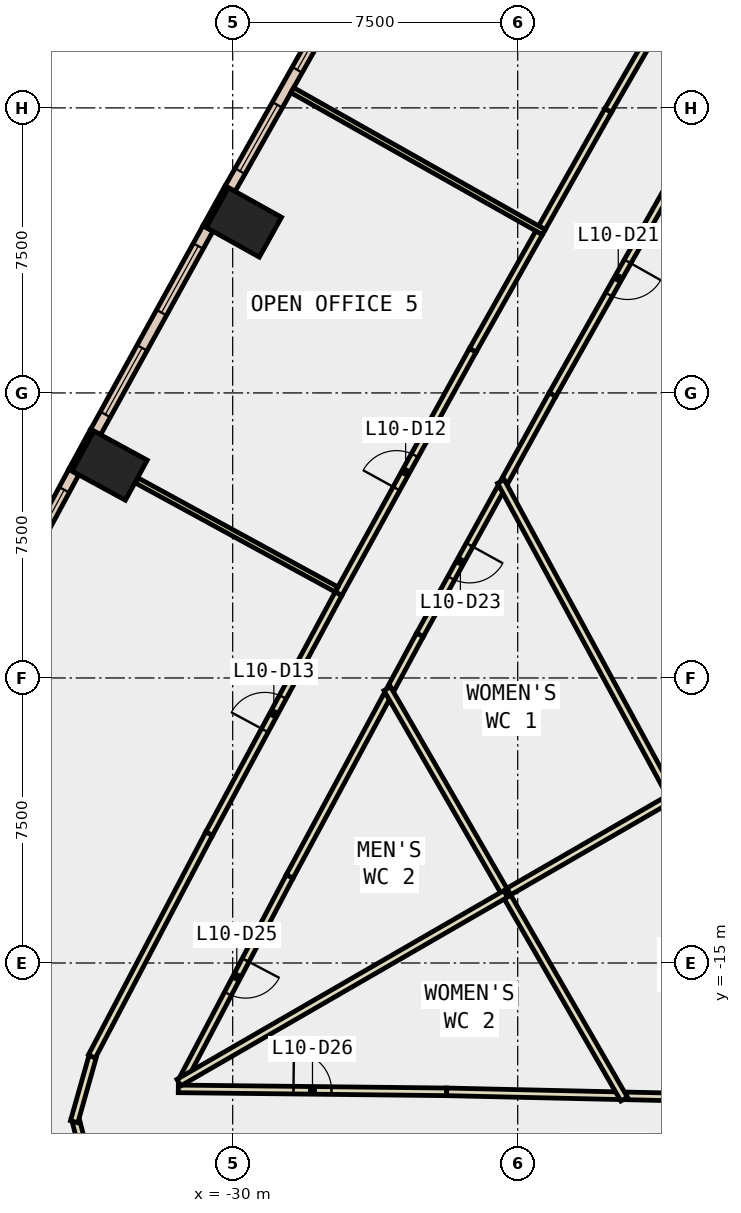
"""IFC4 building model, lengths in metres.
Left out: names, types, materials, properties, quantities, classifications, styles, units other than length and angle.
Written with IfcOpenShell. Run it as: python <this file> out.ifc"""

import sys

from ifc_helpers import new_model, si_unit, direction, frame, frame_2d, origin, origin_2d, place, context, subcontext, project, spatial, rectangle, extrude, element, fill, save


model = new_model("IFC4")
c1 = context("Model", 3, precision=1e-05, world=origin(), true_north=direction((0.0, 1.0)))
c2 = subcontext(c1, "Body", "Model", "MODEL_VIEW")
j1 = project(units=[si_unit("LENGTHUNIT", "METRE"), si_unit("PLANEANGLEUNIT", "RADIAN")], contexts=[c1])
p1 = place(None, origin())
s1 = spatial("IfcSite", under=j1, at=p1, CompositionType="ELEMENT")
p2 = place(p1, origin())
s2 = spatial("IfcBuilding", under=s1, at=p2, CompositionType="ELEMENT")
p3 = place(p2, frame((0.0, 0.0, 51.8)))
s3 = spatial("IfcBuildingStorey", under=s2, at=p3, CompositionType="ELEMENT", Elevation=51.8)
for number, where, z_axis, x_axis in (
    (1, (-29.706, 4.487, -0.4), (0.0, 0.0, 1.0), (0.487, 0.873, 0.0)),
    (2, (-33.238, -1.913, -0.4), (0.0, 0.0, 1.0), (0.478, 0.878, 0.0)),
):
    element("IfcColumn", number, at=place(p3, frame(where, z_axis=z_axis, x_axis=x_axis)), inside=s3, PredefinedType="COLUMN", context=c2, shape_type="SweptSolid", body=[
        extrude(rectangle(XDim=1.2, YDim=1.6, at=origin_2d()), origin(), (0.0, 0.0, 1.0), 4.2),
    ])
p4 = place(p3, frame((-30.156, 5.425, 0.0), z_axis=(0.0, 0.0, 1.0), x_axis=(-0.486730996044, -0.87355190887, 0.0)))
e3 = element("IfcWall", 3, at=p4, inside=s3, PredefinedType="STANDARD", context=c2, shape_type="SweptSolid", body=[
    extrude(rectangle(XDim=1.2, YDim=0.1, at=frame_2d((0.6, 0.0))), origin(), (0.0, 0.0, 1.0), 3.8),
])
p5 = place(p3, frame((-33.697, -0.98, 0.0), z_axis=(0.0, 0.0, 1.0), x_axis=(-0.478267644701, -0.878214131082, 0.0)))
e4 = element("IfcWall", 4, at=p5, inside=s3, PredefinedType="STANDARD", context=c2, shape_type="SweptSolid", body=[
    extrude(rectangle(XDim=1.2, YDim=0.1, at=frame_2d((0.6, 0.0))), origin(), (0.0, 0.0, 1.0), 3.8),
])
p6 = place(p3, frame((-27.058, 10.705, 0.0), z_axis=(0.0, 0.0, 1.0), x_axis=(-0.49151046248, -0.870871669807, 0.0)))
e5 = element("IfcWall", 5, at=p6, inside=s3, PredefinedType="STANDARD", context=c2, shape_type="SweptSolid", body=[
    extrude(rectangle(XDim=6.122, YDim=0.3, at=frame_2d((3.061, 0.0))), origin(), (0.0, 0.0, 1.0), 3.8),
])
p7 = place(p6, frame((0.53, 0.0, 0.9)))
e6 = element("IfcOpeningElement", 6, at=p7, cuts=e5, PredefinedType="OPENING", context=c2, shape_type="SweptSolid", body=[
    extrude(rectangle(XDim=2.0, YDim=2.6, at=frame_2d((1.0, 1.3))), frame((0.0, 0.16, 0.0), z_axis=(0.0, -1.0, 0.0), x_axis=(1.0, 0.0, 0.0)), (0.0, 0.0, 1.0), 0.32),
])
p8 = place(p6, frame((3.591, 0.0, 0.9)))
e7 = element("IfcOpeningElement", 7, at=p8, cuts=e5, PredefinedType="OPENING", context=c2, shape_type="SweptSolid", body=[
    extrude(rectangle(XDim=2.0, YDim=2.6, at=frame_2d((1.0, 1.3))), frame((0.0, 0.16, 0.0), z_axis=(0.0, -1.0, 0.0), x_axis=(1.0, 0.0, 0.0)), (0.0, 0.0, 1.0), 0.32),
])
p9 = place(p3, frame((-30.65, 4.328, 0.0), z_axis=(0.0, 0.0, 1.0), x_axis=(-0.483195456594, -0.875512507465, 0.0)))
e8 = element("IfcWall", 8, at=p9, inside=s3, PredefinedType="STANDARD", context=c2, shape_type="SweptSolid", body=[
    extrude(rectangle(XDim=6.12, YDim=0.3, at=frame_2d((3.06, 0.0))), origin(), (0.0, 0.0, 1.0), 3.8),
])
p10 = place(p9, frame((0.53, 0.0, 0.9)))
e9 = element("IfcOpeningElement", 9, at=p10, cuts=e8, PredefinedType="OPENING", context=c2, shape_type="SweptSolid", body=[
    extrude(rectangle(XDim=2.0, YDim=2.6, at=frame_2d((1.0, 1.3))), frame((0.0, 0.16, 0.0), z_axis=(0.0, -1.0, 0.0), x_axis=(1.0, 0.0, 0.0)), (0.0, 0.0, 1.0), 0.32),
])
p11 = place(p9, frame((3.59, 0.0, 0.9)))
e10 = element("IfcOpeningElement", 10, at=p11, cuts=e8, PredefinedType="OPENING", context=c2, shape_type="SweptSolid", body=[
    extrude(rectangle(XDim=2.0, YDim=2.6, at=frame_2d((1.0, 1.3))), frame((0.0, 0.16, 0.0), z_axis=(0.0, -1.0, 0.0), x_axis=(1.0, 0.0, 0.0)), (0.0, 0.0, 1.0), 0.32),
])
p12 = place(p3, frame((-34.181, -2.082, 0.0), z_axis=(0.0, 0.0, 1.0), x_axis=(-0.474584950749, -0.880209704856, 0.0)))
e11 = element("IfcWall", 11, at=p12, inside=s3, PredefinedType="STANDARD", context=c2, shape_type="SweptSolid", body=[
    extrude(rectangle(XDim=6.121, YDim=0.3, at=frame_2d((3.061, 0.0))), origin(), (0.0, 0.0, 1.0), 3.8),
])
p13 = place(p12, frame((0.53, 0.0, 0.9)))
e12 = element("IfcOpeningElement", 12, at=p13, cuts=e11, PredefinedType="OPENING", context=c2, shape_type="SweptSolid", body=[
    extrude(rectangle(XDim=2.0, YDim=2.6, at=frame_2d((1.0, 1.3))), frame((0.0, 0.16, 0.0), z_axis=(0.0, -1.0, 0.0), x_axis=(1.0, 0.0, 0.0)), (0.0, 0.0, 1.0), 0.32),
])
p14 = place(p12, frame((3.591, 0.0, 0.9)))
e13 = element("IfcOpeningElement", 13, at=p14, cuts=e11, PredefinedType="OPENING", context=c2, shape_type="SweptSolid", body=[
    extrude(rectangle(XDim=2.0, YDim=2.6, at=frame_2d((1.0, 1.3))), frame((0.0, 0.16, 0.0), z_axis=(0.0, -1.0, 0.0), x_axis=(1.0, 0.0, 0.0)), (0.0, 0.0, 1.0), 0.32),
])
p15 = place(p3, frame((-18.122, 6.092, 0.0), z_axis=(0.0, 0.0, 1.0), x_axis=(-0.491430359405, -0.870916874251, 0.0)))
e14 = element("IfcWall", 14, at=p15, inside=s3, PredefinedType="PARTITIONING", context=c2, shape_type="SweptSolid", body=[
    extrude(rectangle(XDim=7.047, YDim=0.2, at=frame_2d((3.523, 0.0))), origin(), (0.0, 0.0, 1.0), 3.8),
])
p16 = place(p15, frame((3.024, 0.0, 0.0)))
e15 = element("IfcOpeningElement", 15, at=p16, cuts=e14, PredefinedType="OPENING", context=c2, shape_type="SweptSolid", body=[
    extrude(rectangle(XDim=1.0, YDim=2.1, at=frame_2d((0.5, 1.05))), frame((0.0, 0.11, 0.0), z_axis=(0.0, -1.0, 0.0), x_axis=(1.0, 0.0, 0.0)), (0.0, 0.0, 1.0), 0.22),
])
p17 = place(p3, frame((-21.585, -0.045, 0.0), z_axis=(0.0, 0.0, 1.0), x_axis=(-0.483139162319, -0.875543573921, 0.0)))
e16 = element("IfcWall", 16, at=p17, inside=s3, PredefinedType="PARTITIONING", context=c2, shape_type="SweptSolid", body=[
    extrude(rectangle(XDim=2.61, YDim=0.2, at=frame_2d((1.305, 0.0))), origin(), (0.0, 0.0, 1.0), 3.8),
])
p18 = place(p3, frame((-22.942, -2.505, 0.0), z_axis=(0.0, 0.0, 1.0), x_axis=(-0.48320751977, -0.875505849688, 0.0)))
e17 = element("IfcWall", 17, at=p18, inside=s3, PredefinedType="PARTITIONING", context=c2, shape_type="SweptSolid", body=[
    extrude(rectangle(XDim=4.412, YDim=0.2, at=frame_2d((2.206, 0.0))), origin(), (0.0, 0.0, 1.0), 3.8),
])
p19 = place(p18, frame((1.706, 0.0, 0.0)))
e18 = element("IfcOpeningElement", 18, at=p19, cuts=e17, PredefinedType="OPENING", context=c2, shape_type="SweptSolid", body=[
    extrude(rectangle(XDim=1.0, YDim=2.1, at=frame_2d((0.5, 1.05))), frame((0.0, 0.11, 0.0), z_axis=(0.0, -1.0, 0.0), x_axis=(1.0, 0.0, 0.0)), (0.0, 0.0, 1.0), 0.22),
])
p20 = place(p3, frame((-25.074, -6.368, 0.0), z_axis=(0.0, 0.0, 1.0), x_axis=(-0.474616646546, -0.880192614614, 0.0)))
e19 = element("IfcWall", 19, at=p20, inside=s3, PredefinedType="PARTITIONING", context=c2, shape_type="SweptSolid", body=[
    extrude(rectangle(XDim=1.605, YDim=0.2, at=frame_2d((0.803, 0.0))), origin(), (0.0, 0.0, 1.0), 3.8),
])
p21 = place(p3, frame((-19.649, -18.496, 0.0), z_axis=(0.0, 0.0, 1.0), x_axis=(0.999744980574, -0.02258259988, 0.0)))
e20 = element("IfcWall", 20, at=p21, inside=s3, PredefinedType="PARTITIONING", context=c2, shape_type="SweptSolid", body=[
    extrude(rectangle(XDim=3.676, YDim=0.2, at=frame_2d((1.838, 0.0))), origin(), (0.0, 0.0, 1.0), 3.8),
])
p22 = place(p3, frame((-25.931, -7.957, 0.0), z_axis=(0.0, 0.0, 1.0), x_axis=(-0.474554072379, -0.880226352928, 0.0)))
e21 = element("IfcWall", 21, at=p22, inside=s3, PredefinedType="PARTITIONING", context=c2, shape_type="SweptSolid", body=[
    extrude(rectangle(XDim=5.416, YDim=0.2, at=frame_2d((2.708, 0.0))), origin(), (0.0, 0.0, 1.0), 3.8),
])
p23 = place(p3, frame((-28.501, -12.724, 0.0), z_axis=(0.0, 0.0, 1.0), x_axis=(-0.465933418625, -0.884819783576, 0.0)))
e22 = element("IfcWall", 22, at=p23, inside=s3, PredefinedType="PARTITIONING", context=c2, shape_type="SweptSolid", body=[
    extrude(rectangle(XDim=5.973, YDim=0.2, at=frame_2d((2.986, 0.0))), origin(), (0.0, 0.0, 1.0), 3.8),
])
p24 = place(p23, frame((2.486, 0.0, 0.0)))
e23 = element("IfcOpeningElement", 23, at=p24, cuts=e22, PredefinedType="OPENING", context=c2, shape_type="SweptSolid", body=[
    extrude(rectangle(XDim=1.0, YDim=2.1, at=frame_2d((0.5, 1.05))), frame((0.0, 0.11, 0.0), z_axis=(0.0, -1.0, 0.0), x_axis=(1.0, 0.0, 0.0)), (0.0, 0.0, 1.0), 0.22),
])
p25 = place(p3, frame((-31.431, -18.312, 0.0), z_axis=(0.0, 0.0, 1.0), x_axis=(0.999939195602, -0.011027470214, 0.0)))
e24 = element("IfcWall", 24, at=p25, inside=s3, PredefinedType="PARTITIONING", context=c2, shape_type="SweptSolid", body=[
    extrude(rectangle(XDim=7.062, YDim=0.2, at=frame_2d((3.531, 0.0))), origin(), (0.0, 0.0, 1.0), 3.8),
])
p26 = place(p25, frame((3.031, 0.0, 0.0)))
e25 = element("IfcOpeningElement", 25, at=p26, cuts=e24, PredefinedType="OPENING", context=c2, shape_type="SweptSolid", body=[
    extrude(rectangle(XDim=1.0, YDim=2.1, at=frame_2d((0.5, 1.05))), frame((0.0, 0.11, 0.0), z_axis=(0.0, -1.0, 0.0), x_axis=(1.0, 0.0, 0.0)), (0.0, 0.0, 1.0), 0.22),
])
p27 = place(p3, frame((-24.369, -18.39, 0.0), z_axis=(0.0, 0.0, 1.0), x_axis=(0.99974519793, -0.022572975354, 0.0)))
e26 = element("IfcWall", 26, at=p27, inside=s3, PredefinedType="PARTITIONING", context=c2, shape_type="SweptSolid", body=[
    extrude(rectangle(XDim=4.521, YDim=0.2, at=frame_2d((2.26, 0.0))), origin(), (0.0, 0.0, 1.0), 3.8),
])
p28 = place(p3, frame((-21.863, 4.345, 0.0), z_axis=(0.0, 0.0, 1.0), x_axis=(0.491394823876, 0.87093692485, 0.0)))
e27 = element("IfcWall", 27, at=p28, inside=s3, PredefinedType="PARTITIONING", context=c2, shape_type="SweptSolid", body=[
    extrude(rectangle(XDim=3.547, YDim=0.2, at=frame_2d((1.773, 0.0))), origin(), (0.0, 0.0, 1.0), 3.8),
])
p29 = place(p3, frame((-20.12, 7.434, 0.0), z_axis=(0.0, 0.0, 1.0), x_axis=(0.500039488902, 0.866002603656, 0.0)))
e28 = element("IfcWall", 28, at=p29, inside=s3, PredefinedType="PARTITIONING", context=c2, shape_type="SweptSolid", body=[
    extrude(rectangle(XDim=7.244, YDim=0.2, at=frame_2d((3.622, 0.0))), origin(), (0.0, 0.0, 1.0), 3.8),
])
p30 = place(p29, frame((3.122, 0.0, 0.0)))
e29 = element("IfcOpeningElement", 29, at=p30, cuts=e28, PredefinedType="OPENING", context=c2, shape_type="SweptSolid", body=[
    extrude(rectangle(XDim=1.0, YDim=2.1, at=frame_2d((0.5, 1.05))), frame((0.0, 0.11, 0.0), z_axis=(0.0, -1.0, 0.0), x_axis=(1.0, 0.0, 0.0)), (0.0, 0.0, 1.0), 0.22),
])
p31 = place(p3, frame((-27.217, -5.284, 0.0), z_axis=(0.0, 0.0, 1.0), x_axis=(0.483151415114, 0.875536812517, 0.0)))
e30 = element("IfcWall", 30, at=p31, inside=s3, PredefinedType="PARTITIONING", context=c2, shape_type="SweptSolid", body=[
    extrude(rectangle(XDim=7.319, YDim=0.2, at=frame_2d((3.659, 0.0))), origin(), (0.0, 0.0, 1.0), 3.8),
])
p32 = place(p31, frame((3.159, 0.0, 0.0)))
e31 = element("IfcOpeningElement", 31, at=p32, cuts=e30, PredefinedType="OPENING", context=c2, shape_type="SweptSolid", body=[
    extrude(rectangle(XDim=1.0, YDim=2.1, at=frame_2d((0.5, 1.05))), frame((0.0, 0.11, 0.0), z_axis=(0.0, -1.0, 0.0), x_axis=(1.0, 0.0, 0.0)), (0.0, 0.0, 1.0), 0.22),
])
p33 = place(p3, frame((-23.681, 1.124, 0.0), z_axis=(0.0, 0.0, 1.0), x_axis=(0.491485799319, 0.870885588965, 0.0)))
e32 = element("IfcWall", 32, at=p33, inside=s3, PredefinedType="PARTITIONING", context=c2, shape_type="SweptSolid", body=[
    extrude(rectangle(XDim=3.548, YDim=0.2, at=frame_2d((1.774, 0.0))), origin(), (0.0, 0.0, 1.0), 3.8),
])
p34 = place(p3, frame((-33.521, -20.105, 0.0), z_axis=(0.0, 0.0, 1.0), x_axis=(-0.713535335808, 0.700619243636, 0.0)))
e33 = element("IfcWall", 33, at=p34, inside=s3, PredefinedType="PARTITIONING", context=c2, shape_type="SweptSolid", body=[
    extrude(rectangle(XDim=0.775, YDim=0.2, at=frame_2d((0.387, 0.0))), origin(), (0.0, 0.0, 1.0), 3.8),
])
p35 = place(p3, frame((-34.003, -19.631, 0.0), z_axis=(0.0, 0.0, 1.0), x_axis=(-0.250111961061, 0.968216921425, 0.0)))
e34 = element("IfcWall", 34, at=p35, inside=s3, PredefinedType="PARTITIONING", context=c2, shape_type="SweptSolid", body=[
    extrude(rectangle(XDim=0.568, YDim=0.2, at=frame_2d((0.284, 0.0))), origin(), (0.0, 0.0, 1.0), 3.8),
])
p36 = place(p3, frame((-34.172, -19.177, 0.0), z_axis=(0.0, 0.0, 1.0), x_axis=(0.272780480932, 0.962076301144, 0.0)))
e35 = element("IfcWall", 35, at=p36, inside=s3, PredefinedType="PARTITIONING", context=c2, shape_type="SweptSolid", body=[
    extrude(rectangle(XDim=1.778, YDim=0.2, at=frame_2d((0.889, 0.0))), origin(), (0.0, 0.0, 1.0), 3.8),
])
p37 = place(p3, frame((-33.706, -17.458, 0.0), z_axis=(0.0, 0.0, 1.0), x_axis=(0.465905874098, 0.884834287582, 0.0)))
e36 = element("IfcWall", 36, at=p37, inside=s3, PredefinedType="PARTITIONING", context=c2, shape_type="SweptSolid", body=[
    extrude(rectangle(XDim=6.626, YDim=0.2, at=frame_2d((3.313, 0.0))), origin(), (0.0, 0.0, 1.0), 3.8),
])
p38 = place(p3, frame((-30.619, -11.595, 0.0), z_axis=(0.0, 0.0, 1.0), x_axis=(0.474595197669, 0.880204179921, 0.0)))
e37 = element("IfcWall", 37, at=p38, inside=s3, PredefinedType="PARTITIONING", context=c2, shape_type="SweptSolid", body=[
    extrude(rectangle(XDim=7.17, YDim=0.2, at=frame_2d((3.585, 0.0))), origin(), (0.0, 0.0, 1.0), 3.8),
])
p39 = place(p38, frame((3.085, 0.0, 0.0)))
e38 = element("IfcOpeningElement", 38, at=p39, cuts=e37, PredefinedType="OPENING", context=c2, shape_type="SweptSolid", body=[
    extrude(rectangle(XDim=1.0, YDim=2.1, at=frame_2d((0.5, 1.05))), frame((0.0, 0.11, 0.0), z_axis=(0.0, -1.0, 0.0), x_axis=(1.0, 0.0, 0.0)), (0.0, 0.0, 1.0), 0.22),
])
p40 = place(p3, frame((-18.384, -10.725, 0.0), z_axis=(0.0, 0.0, 1.0), x_axis=(-0.477137547132, 0.878828630119, 0.0)))
e39 = element("IfcWall", 39, at=p40, inside=s3, PredefinedType="PARTITIONING", context=c2, shape_type="SweptSolid", body=[
    extrude(rectangle(XDim=9.552, YDim=0.2, at=frame_2d((4.776, 0.0))), origin(), (0.0, 0.0, 1.0), 3.8),
])
p41 = place(p3, frame((-18.519, -10.687, 0.0), z_axis=(0.0, 0.0, 1.0), x_axis=(-0.866063668779, -0.499933717229, 0.0)))
e40 = element("IfcWall", 40, at=p41, inside=s3, PredefinedType="PARTITIONING", context=c2, shape_type="SweptSolid", body=[
    extrude(rectangle(XDim=4.969, YDim=0.2, at=frame_2d((2.484, 0.0))), origin(), (0.0, 0.0, 1.0), 3.8),
])
p42 = place(p3, frame((-22.822, -13.171, 0.0), z_axis=(0.0, 0.0, 1.0), x_axis=(-0.499974913987, 0.866039886717, 0.0)))
e41 = element("IfcWall", 41, at=p42, inside=s3, PredefinedType="PARTITIONING", context=c2, shape_type="SweptSolid", body=[
    extrude(rectangle(XDim=6.222, YDim=0.2, at=frame_2d((3.111, 0.0))), origin(), (0.0, 0.0, 1.0), 3.8),
])
p43 = place(p3, frame((-19.699, -18.581, 0.0), z_axis=(0.0, 0.0, 1.0), x_axis=(-0.499899838407, 0.866083224385, 0.0)))
e42 = element("IfcWall", 42, at=p43, inside=s3, PredefinedType="PARTITIONING", context=c2, shape_type="SweptSolid", body=[
    extrude(rectangle(XDim=6.235, YDim=0.2, at=frame_2d((3.118, 0.0))), origin(), (0.0, 0.0, 1.0), 3.8),
])
p44 = place(p3, frame((-22.816, -13.181, 0.0), z_axis=(0.0, 0.0, 1.0), x_axis=(-0.86601529143, -0.500017514703, 0.0)))
e43 = element("IfcWall", 43, at=p44, inside=s3, PredefinedType="PARTITIONING", context=c2, shape_type="SweptSolid", body=[
    extrude(rectangle(XDim=9.932, YDim=0.2, at=frame_2d((4.966, 0.0))), origin(), (0.0, 0.0, 1.0), 3.8),
])
p45 = place(p3, frame((-21.813, 4.231, 0.0), z_axis=(0.0, 0.0, 1.0), x_axis=(-0.870901264369, 0.491458022337, 0.0)))
e44 = element("IfcWall", 44, at=p45, inside=s3, PredefinedType="PARTITIONING", context=c2, shape_type="SweptSolid", body=[
    extrude(rectangle(XDim=7.6, YDim=0.15, at=frame_2d((3.8, 0.0))), origin(), (0.0, 0.0, 1.0), 3.8),
])
p46 = place(p3, frame((-27.268, -5.171, 0.0), z_axis=(0.0, 0.0, 1.0), x_axis=(-0.877837854343, 0.478957932895, 0.0)))
e45 = element("IfcWall", 45, at=p46, inside=s3, PredefinedType="PARTITIONING", context=c2, shape_type="SweptSolid", body=[
    extrude(rectangle(XDim=5.982, YDim=0.15, at=frame_2d((2.991, 0.0))), origin(), (0.0, 0.0, 1.0), 3.8),
])
p47 = place(p7, origin())
e46 = element("IfcWindow", 46, at=p47, inside=s3, PartitioningType="SINGLE_PANEL", PredefinedType="WINDOW", context=c2, shape_type="SweptSolid", body=[
    extrude(rectangle(XDim=2.0, YDim=2.6, at=frame_2d((1.0, 1.3))), frame((0.0, 0.03, 0.0), z_axis=(0.0, -1.0, 0.0), x_axis=(1.0, 0.0, 0.0)), (0.0, 0.0, 1.0), 0.06),
])
fill(e6, e46)
p48 = place(p8, origin())
e47 = element("IfcWindow", 47, at=p48, inside=s3, PartitioningType="SINGLE_PANEL", PredefinedType="WINDOW", context=c2, shape_type="SweptSolid", body=[
    extrude(rectangle(XDim=2.0, YDim=2.6, at=frame_2d((1.0, 1.3))), frame((0.0, 0.03, 0.0), z_axis=(0.0, -1.0, 0.0), x_axis=(1.0, 0.0, 0.0)), (0.0, 0.0, 1.0), 0.06),
])
fill(e7, e47)
p49 = place(p10, origin())
e48 = element("IfcWindow", 48, at=p49, inside=s3, PartitioningType="SINGLE_PANEL", PredefinedType="WINDOW", context=c2, shape_type="SweptSolid", body=[
    extrude(rectangle(XDim=2.0, YDim=2.6, at=frame_2d((1.0, 1.3))), frame((0.0, 0.03, 0.0), z_axis=(0.0, -1.0, 0.0), x_axis=(1.0, 0.0, 0.0)), (0.0, 0.0, 1.0), 0.06),
])
fill(e9, e48)
p50 = place(p11, origin())
e49 = element("IfcWindow", 49, at=p50, inside=s3, PartitioningType="SINGLE_PANEL", PredefinedType="WINDOW", context=c2, shape_type="SweptSolid", body=[
    extrude(rectangle(XDim=2.0, YDim=2.6, at=frame_2d((1.0, 1.3))), frame((0.0, 0.03, 0.0), z_axis=(0.0, -1.0, 0.0), x_axis=(1.0, 0.0, 0.0)), (0.0, 0.0, 1.0), 0.06),
])
fill(e10, e49)
p51 = place(p13, origin())
e50 = element("IfcWindow", 50, at=p51, inside=s3, PartitioningType="SINGLE_PANEL", PredefinedType="WINDOW", context=c2, shape_type="SweptSolid", body=[
    extrude(rectangle(XDim=2.0, YDim=2.6, at=frame_2d((1.0, 1.3))), frame((0.0, 0.03, 0.0), z_axis=(0.0, -1.0, 0.0), x_axis=(1.0, 0.0, 0.0)), (0.0, 0.0, 1.0), 0.06),
])
fill(e12, e50)
p52 = place(p32, origin())
e51 = element("IfcDoor", 51, at=p52, inside=s3, OperationType="SINGLE_SWING_LEFT", PredefinedType="DOOR", context=c2, shape_type="SweptSolid", body=[
    extrude(rectangle(XDim=1.0, YDim=2.1, at=frame_2d((0.5, 1.05))), frame((0.0, 0.025, 0.0), z_axis=(0.0, -1.0, 0.0), x_axis=(1.0, 0.0, 0.0)), (0.0, 0.0, 1.0), 0.05),
])
fill(e31, e51)
p53 = place(p39, origin())
e52 = element("IfcDoor", 52, at=p53, inside=s3, OperationType="SINGLE_SWING_LEFT", PredefinedType="DOOR", context=c2, shape_type="SweptSolid", body=[
    extrude(rectangle(XDim=1.0, YDim=2.1, at=frame_2d((0.5, 1.05))), frame((0.0, 0.025, 0.0), z_axis=(0.0, -1.0, 0.0), x_axis=(1.0, 0.0, 0.0)), (0.0, 0.0, 1.0), 0.05),
])
fill(e38, e52)
p54 = place(p16, origin())
e53 = element("IfcDoor", 53, at=p54, inside=s3, OperationType="SINGLE_SWING_LEFT", PredefinedType="DOOR", context=c2, shape_type="SweptSolid", body=[
    extrude(rectangle(XDim=1.0, YDim=2.1, at=frame_2d((0.5, 1.05))), frame((0.0, 0.025, 0.0), z_axis=(0.0, -1.0, 0.0), x_axis=(1.0, 0.0, 0.0)), (0.0, 0.0, 1.0), 0.05),
])
fill(e15, e53)
p55 = place(p19, origin())
e54 = element("IfcDoor", 54, at=p55, inside=s3, OperationType="SINGLE_SWING_LEFT", PredefinedType="DOOR", context=c2, shape_type="SweptSolid", body=[
    extrude(rectangle(XDim=1.0, YDim=2.1, at=frame_2d((0.5, 1.05))), frame((0.0, 0.025, 0.0), z_axis=(0.0, -1.0, 0.0), x_axis=(1.0, 0.0, 0.0)), (0.0, 0.0, 1.0), 0.05),
])
fill(e18, e54)
p56 = place(p24, origin())
e55 = element("IfcDoor", 55, at=p56, inside=s3, OperationType="SINGLE_SWING_LEFT", PredefinedType="DOOR", context=c2, shape_type="SweptSolid", body=[
    extrude(rectangle(XDim=1.0, YDim=2.1, at=frame_2d((0.5, 1.05))), frame((0.0, 0.025, 0.0), z_axis=(0.0, -1.0, 0.0), x_axis=(1.0, 0.0, 0.0)), (0.0, 0.0, 1.0), 0.05),
])
fill(e23, e55)
p57 = place(p26, origin())
e56 = element("IfcDoor", 56, at=p57, inside=s3, OperationType="SINGLE_SWING_LEFT", PredefinedType="DOOR", context=c2, shape_type="SweptSolid", body=[
    extrude(rectangle(XDim=1.0, YDim=2.1, at=frame_2d((0.5, 1.05))), frame((0.0, 0.025, 0.0), z_axis=(0.0, -1.0, 0.0), x_axis=(1.0, 0.0, 0.0)), (0.0, 0.0, 1.0), 0.05),
])
fill(e25, e56)
save(model, sys.argv[1])
